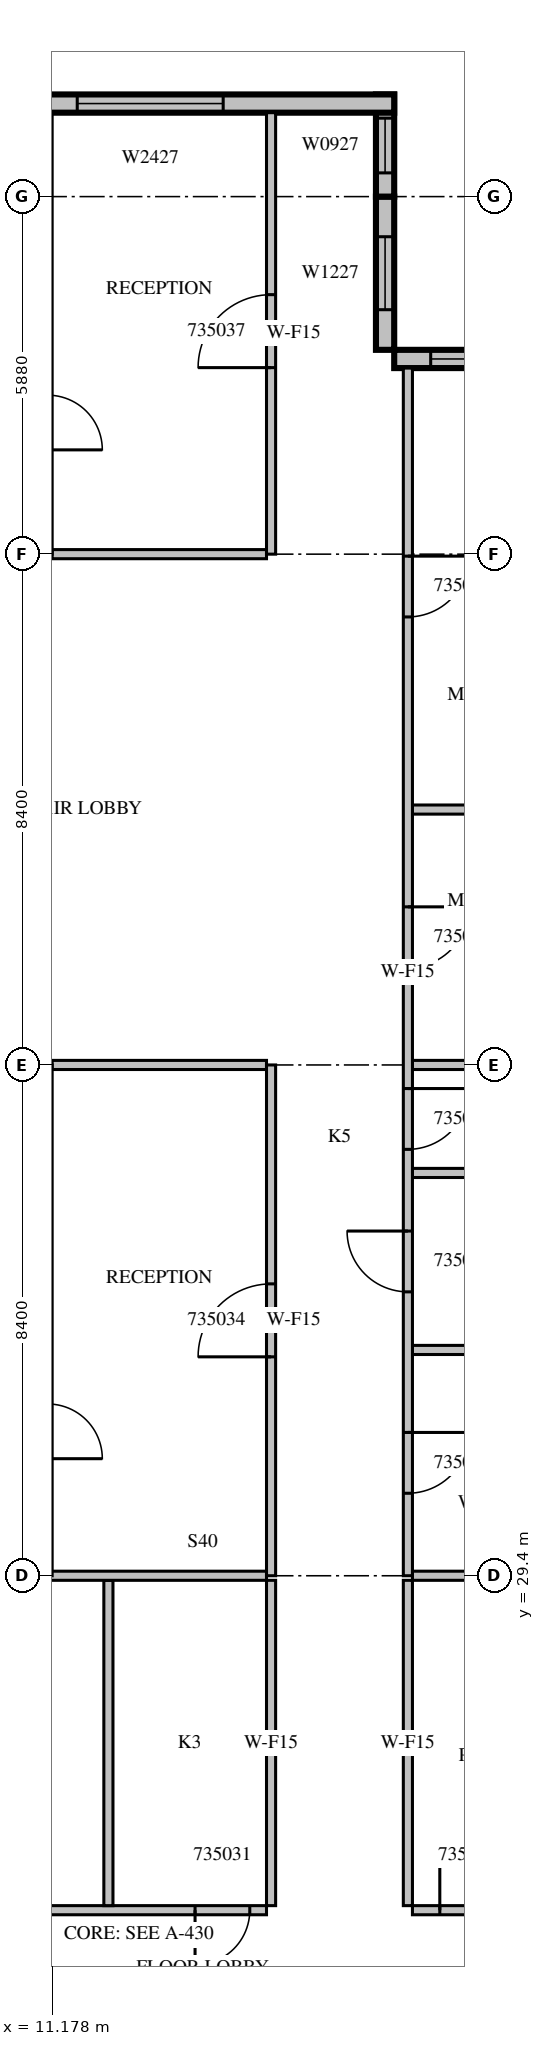
"""IFC4 building model, lengths in metres.
Left out: names, types, materials, properties, quantities, classifications, styles, units other than length and angle.
Written with IfcOpenShell. Run it as: python <this file> out.ifc"""

import sys

from ifc_helpers import new_model, si_unit, direction, frame, frame_2d, origin, place, context, subcontext, project, spatial, rectangle, extrude, source, transform, mapped, element, fill, save


model = new_model("IFC4")
c1 = context("Model", 3, precision=1e-05, world=origin(), true_north=direction((0.0, 1.0)))
c2 = subcontext(c1, "Body", "Model", "MODEL_VIEW")
j1 = project(units=[si_unit("LENGTHUNIT", "METRE"), si_unit("PLANEANGLEUNIT", "RADIAN")], contexts=[c1])
p1 = place(None, origin())
s1 = spatial("IfcSite", under=j1, at=p1, CompositionType="ELEMENT")
p2 = place(p1, origin())
s2 = spatial("IfcBuilding", under=s1, at=p2, CompositionType="ELEMENT")
p3 = place(p2, frame((0.0, 0.0, 158.1)))
s3 = spatial("IfcBuildingStorey", under=s2, at=p3, CompositionType="ELEMENT", Elevation=158.1)
m1 = source(origin(), c2, "Body", "SweptSolid", [
    extrude(rectangle(XDim=4.2, YDim=0.3, at=frame_2d((2.1, 0.0))), origin(), (0.0, 0.0, 1.0), 3.8),
])
p4 = place(p3, frame((21.0, 49.41, 0.0), z_axis=(0.0, 0.0, 1.0), x_axis=(-1.0, 0.0, 0.0)))
e1 = element("IfcWall", 1, at=p4, inside=s3, PredefinedType="STANDARD", context=c2, shape_type="MappedRepresentation", body=[
    mapped(m1, transform((0.0, 0.0, 0.0), scale=1.0)),
])
m2 = source(origin(), c2, "Body", "SweptSolid", [
    extrude(rectangle(XDim=3.0, YDim=2.7, at=frame_2d((1.5, 1.35))), frame((0.0, 0.16, 0.0), z_axis=(0.0, -1.0, 0.0), x_axis=(1.0, 0.0, 0.0)), (0.0, 0.0, 1.0), 0.32),
])
p5 = place(p4, frame((0.6, 0.0, 0.6)))
e2 = element("IfcOpeningElement", 2, at=p5, cuts=e1, PredefinedType="OPENING", context=c2, shape_type="MappedRepresentation", body=[
    mapped(m2, transform((0.0, 0.0, 0.0), scale=1.0)),
])
m3 = source(origin(), c2, "Body", "SweptSolid", [
    extrude(rectangle(XDim=2.52, YDim=0.3, at=frame_2d((1.26, 0.0))), origin(), (0.0, 0.0, 1.0), 3.8),
])
p6 = place(p3, frame((16.65, 49.56, 0.0), z_axis=(0.0, 0.0, 1.0), x_axis=(0.0, 1.0, 0.0)))
e3 = element("IfcWall", 3, at=p6, inside=s3, PredefinedType="STANDARD", context=c2, shape_type="MappedRepresentation", body=[
    mapped(m3, transform((0.0, 0.0, 0.0), scale=1.0)),
])
m4 = source(origin(), c2, "Body", "SweptSolid", [
    extrude(rectangle(XDim=1.2, YDim=2.7, at=frame_2d((0.6, 1.35))), frame((0.0, 0.16, 0.0), z_axis=(0.0, -1.0, 0.0), x_axis=(1.0, 0.0, 0.0)), (0.0, 0.0, 1.0), 0.32),
])
p7 = place(p6, frame((0.66, 0.0, 0.6)))
e4 = element("IfcOpeningElement", 4, at=p7, cuts=e3, PredefinedType="OPENING", context=c2, shape_type="MappedRepresentation", body=[
    mapped(m4, transform((0.0, 0.0, 0.0), scale=1.0)),
])
m5 = source(origin(), c2, "Body", "SweptSolid", [
    extrude(rectangle(XDim=1.68, YDim=0.3, at=frame_2d((0.84, 0.0))), origin(), (0.0, 0.0, 1.0), 3.8),
])
p8 = place(p3, frame((16.65, 52.08, 0.0), z_axis=(0.0, 0.0, 1.0), x_axis=(0.0, 1.0, 0.0)))
e5 = element("IfcWall", 5, at=p8, inside=s3, PredefinedType="STANDARD", context=c2, shape_type="MappedRepresentation", body=[
    mapped(m5, transform((0.0, 0.0, 0.0), scale=1.0)),
])
m6 = source(origin(), c2, "Body", "SweptSolid", [
    extrude(rectangle(XDim=0.9, YDim=2.7, at=frame_2d((0.45, 1.35))), frame((0.0, 0.16, 0.0), z_axis=(0.0, -1.0, 0.0), x_axis=(1.0, 0.0, 0.0)), (0.0, 0.0, 1.0), 0.32),
])
p9 = place(p8, frame((0.39, 0.0, 0.6)))
e6 = element("IfcOpeningElement", 6, at=p9, cuts=e5, PredefinedType="OPENING", context=c2, shape_type="MappedRepresentation", body=[
    mapped(m6, transform((0.0, 0.0, 0.0), scale=1.0)),
])
m7 = source(origin(), c2, "Body", "SweptSolid", [
    extrude(rectangle(XDim=10.5, YDim=0.3, at=frame_2d((5.25, 0.0))), origin(), (0.0, 0.0, 1.0), 3.8),
])
p10 = place(p3, frame((16.8, 53.61, 0.0), z_axis=(0.0, 0.0, 1.0), x_axis=(-1.0, 0.0, 0.0)))
e7 = element("IfcWall", 7, at=p10, inside=s3, PredefinedType="STANDARD", context=c2, shape_type="MappedRepresentation", body=[
    mapped(m7, transform((0.0, 0.0, 0.0), scale=1.0)),
])
m8 = source(origin(), c2, "Body", "SweptSolid", [
    extrude(rectangle(XDim=1.8, YDim=2.7, at=frame_2d((0.9, 1.35))), frame((0.0, 0.16, 0.0), z_axis=(0.0, -1.0, 0.0), x_axis=(1.0, 0.0, 0.0)), (0.0, 0.0, 1.0), 0.32),
])
p11 = place(p10, frame((8.025, 0.0, 0.6)))
e8 = element("IfcOpeningElement", 8, at=p11, cuts=e7, PredefinedType="OPENING", context=c2, shape_type="MappedRepresentation", body=[
    mapped(m8, transform((0.0, 0.0, 0.0), scale=1.0)),
])
m9 = source(origin(), c2, "Body", "SweptSolid", [
    extrude(rectangle(XDim=2.4, YDim=2.7, at=frame_2d((1.2, 1.35))), frame((0.0, 0.16, 0.0), z_axis=(0.0, -1.0, 0.0), x_axis=(1.0, 0.0, 0.0)), (0.0, 0.0, 1.0), 0.32),
])
p12 = place(p10, frame((2.812, 0.0, 0.6)))
e9 = element("IfcOpeningElement", 9, at=p12, cuts=e7, PredefinedType="OPENING", context=c2, shape_type="MappedRepresentation", body=[
    mapped(m9, transform((0.0, 0.0, 0.0), scale=1.0)),
])
m10 = source(origin(), c2, "Body", "SweptSolid", [
    extrude(rectangle(XDim=8.195, YDim=0.15, at=frame_2d((4.098, 0.0))), origin(), (0.0, 0.0, 1.0), 3.8),
])
p13 = place(p3, frame((6.505, 23.9, 0.0), z_axis=(0.0, 0.0, 1.0), x_axis=(1.0, 0.0, 0.0)))
e10 = element("IfcWall", 10, at=p13, inside=s3, PredefinedType="PARTITIONING", context=c2, shape_type="MappedRepresentation", body=[
    mapped(m10, transform((0.0, 0.0, 0.0), scale=1.0)),
])
m11 = source(origin(), c2, "Body", "SweptSolid", [
    extrude(rectangle(XDim=0.9, YDim=2.1, at=frame_2d((0.45, 1.05))), frame((0.0, 0.085, 0.0), z_axis=(0.0, -1.0, 0.0), x_axis=(1.0, 0.0, 0.0)), (0.0, 0.0, 1.0), 0.17),
])
p14 = place(p13, frame((2.095, 0.0, 0.0)))
e11 = element("IfcOpeningElement", 11, at=p14, cuts=e10, PredefinedType="OPENING", context=c2, shape_type="MappedRepresentation", body=[
    mapped(m11, transform((0.0, 0.0, 0.0), scale=1.0)),
])
p15 = place(p13, frame((7.02, 0.0, 0.0)))
e12 = element("IfcOpeningElement", 12, at=p15, cuts=e10, PredefinedType="OPENING", context=c2, shape_type="MappedRepresentation", body=[
    mapped(m11, transform((0.0, 0.0, 0.0), scale=1.0)),
])
m12 = source(origin(), c2, "Body", "SweptSolid", [
    extrude(rectangle(XDim=3.6, YDim=0.15, at=frame_2d((1.8, 0.0))), origin(), (0.0, 0.0, 1.0), 3.8),
])
p16 = place(p3, frame((17.1, 23.9, 0.0), z_axis=(0.0, 0.0, 1.0), x_axis=(1.0, 0.0, 0.0)))
e13 = element("IfcWall", 13, at=p16, inside=s3, PredefinedType="PARTITIONING", context=c2, shape_type="MappedRepresentation", body=[
    mapped(m12, transform((0.0, 0.0, 0.0), scale=1.0)),
])
p17 = place(p16, frame((0.45, 0.0, 0.0)))
e14 = element("IfcOpeningElement", 14, at=p17, cuts=e13, PredefinedType="OPENING", context=c2, shape_type="MappedRepresentation", body=[
    mapped(m11, transform((0.0, 0.0, 0.0), scale=1.0)),
])
m13 = source(origin(), c2, "Body", "SweptSolid", [
    extrude(rectangle(XDim=5.35, YDim=0.15, at=frame_2d((2.675, 0.0))), origin(), (0.0, 0.0, 1.0), 3.8),
])
for number, where, z_axis, x_axis in (
    (15, (12.1, 23.975, 0.0), (0.0, 0.0, 1.0), (0.0, 1.0, 0.0)),
    (16, (14.775, 23.975, 0.0), (0.0, 0.0, 1.0), (0.0, 1.0, 0.0)),
    (17, (17.025, 29.325, 0.0), (0.0, 0.0, 1.0), (0.0, -1.0, 0.0)),
):
    element("IfcWall", number, at=place(p3, frame(where, z_axis=z_axis, x_axis=x_axis)), inside=s3, PredefinedType="PARTITIONING", context=c2, shape_type="MappedRepresentation", body=[
        mapped(m13, transform((0.0, 0.0, 0.0), scale=1.0)),
    ])
m14 = source(origin(), c2, "Body", "SweptSolid", [
    extrude(rectangle(XDim=3.676, YDim=0.15, at=frame_2d((1.838, 0.0))), origin(), (0.0, 0.0, 1.0), 3.8),
])
p18 = place(p3, frame((14.7, 29.4, 0.0), z_axis=(0.0, 0.0, 1.0), x_axis=(-1.0, 0.0, 0.0)))
e18 = element("IfcWall", 18, at=p18, inside=s3, PredefinedType="PARTITIONING", context=c2, shape_type="MappedRepresentation", body=[
    mapped(m14, transform((0.0, 0.0, 0.0), scale=1.0)),
])
m15 = source(origin(), c2, "Body", "SweptSolid", [
    extrude(rectangle(XDim=2.851, YDim=0.15, at=frame_2d((1.425, 0.0))), origin(), (0.0, 0.0, 1.0), 3.8),
])
p19 = place(p3, frame((19.951, 29.4, 0.0), z_axis=(0.0, 0.0, 1.0), x_axis=(-1.0, 0.0, 0.0)))
e19 = element("IfcWall", 19, at=p19, inside=s3, PredefinedType="PARTITIONING", context=c2, shape_type="MappedRepresentation", body=[
    mapped(m15, transform((0.0, 0.0, 0.0), scale=1.0)),
])
m16 = source(origin(), c2, "Body", "SweptSolid", [
    extrude(rectangle(XDim=3.525, YDim=0.15, at=frame_2d((1.762, 0.0))), origin(), (0.0, 0.0, 1.0), 3.8),
])
for number, where, z_axis, x_axis in (
    (20, (14.7, 37.8, 0.0), (0.0, 0.0, 1.0), (-1.0, 0.0, 0.0)),
    (21, (14.7, 46.2, 0.0), (0.0, 0.0, 1.0), (-1.0, 0.0, 0.0)),
):
    element("IfcWall", number, at=place(p3, frame(where, z_axis=z_axis, x_axis=x_axis)), inside=s3, PredefinedType="PARTITIONING", context=c2, shape_type="MappedRepresentation", body=[
        mapped(m16, transform((0.0, 0.0, 0.0), scale=1.0)),
    ])
for number, where, z_axis, x_axis in (
    (22, (17.1, 33.113, 0.0), (0.0, 0.0, 1.0), (1.0, 0.0, 0.0)),
    (23, (17.1, 36.024, 0.0), (0.0, 0.0, 1.0), (1.0, 0.0, 0.0)),
):
    element("IfcWall", number, at=place(p3, frame(where, z_axis=z_axis, x_axis=x_axis)), inside=s3, PredefinedType="PARTITIONING", context=c2, shape_type="MappedRepresentation", body=[
        mapped(m12, transform((0.0, 0.0, 0.0), scale=1.0)),
    ])
p20 = place(p3, frame((19.951, 37.8, 0.0), z_axis=(0.0, 0.0, 1.0), x_axis=(-1.0, 0.0, 0.0)))
e24 = element("IfcWall", 24, at=p20, inside=s3, PredefinedType="PARTITIONING", context=c2, shape_type="MappedRepresentation", body=[
    mapped(m15, transform((0.0, 0.0, 0.0), scale=1.0)),
])
p21 = place(p3, frame((20.7, 42.0, 0.0), z_axis=(0.0, 0.0, 1.0), x_axis=(-1.0, 0.0, 0.0)))
e25 = element("IfcWall", 25, at=p21, inside=s3, PredefinedType="PARTITIONING", context=c2, shape_type="MappedRepresentation", body=[
    mapped(m12, transform((0.0, 0.0, 0.0), scale=1.0)),
])
m17 = source(origin(), c2, "Body", "SweptSolid", [
    extrude(rectangle(XDim=8.4, YDim=0.15, at=frame_2d((4.2, 0.0))), origin(), (0.0, 0.0, 1.0), 3.8),
])
p22 = place(p3, frame((14.775, 29.4, 0.0), z_axis=(0.0, 0.0, 1.0), x_axis=(0.0, 1.0, 0.0)))
e26 = element("IfcWall", 26, at=p22, inside=s3, PredefinedType="PARTITIONING", context=c2, shape_type="MappedRepresentation", body=[
    mapped(m17, transform((0.0, 0.0, 0.0), scale=1.0)),
])
m18 = source(origin(), c2, "Body", "SweptSolid", [
    extrude(rectangle(XDim=1.2, YDim=2.1, at=frame_2d((0.6, 1.05))), frame((0.0, 0.085, 0.0), z_axis=(0.0, -1.0, 0.0), x_axis=(1.0, 0.0, 0.0)), (0.0, 0.0, 1.0), 0.17),
])
p23 = place(p22, frame((3.6, 0.0, 0.0)))
e27 = element("IfcOpeningElement", 27, at=p23, cuts=e26, PredefinedType="OPENING", context=c2, shape_type="MappedRepresentation", body=[
    mapped(m18, transform((0.0, 0.0, 0.0), scale=1.0)),
])
m19 = source(origin(), c2, "Body", "SweptSolid", [
    extrude(rectangle(XDim=7.26, YDim=0.15, at=frame_2d((3.63, 0.0))), origin(), (0.0, 0.0, 1.0), 3.8),
])
p24 = place(p3, frame((14.775, 46.2, 0.0), z_axis=(0.0, 0.0, 1.0), x_axis=(0.0, 1.0, 0.0)))
e28 = element("IfcWall", 28, at=p24, inside=s3, PredefinedType="PARTITIONING", context=c2, shape_type="MappedRepresentation", body=[
    mapped(m19, transform((0.0, 0.0, 0.0), scale=1.0)),
])
p25 = place(p24, frame((3.067, 0.0, 0.0)))
e29 = element("IfcOpeningElement", 29, at=p25, cuts=e28, PredefinedType="OPENING", context=c2, shape_type="MappedRepresentation", body=[
    mapped(m18, transform((0.0, 0.0, 0.0), scale=1.0)),
])
m20 = source(origin(), c2, "Body", "SweptSolid", [
    extrude(rectangle(XDim=19.86, YDim=0.15, at=frame_2d((9.93, 0.0))), origin(), (0.0, 0.0, 1.0), 3.8),
])
p26 = place(p3, frame((17.025, 49.26, 0.0), z_axis=(0.0, 0.0, 1.0), x_axis=(0.0, -1.0, 0.0)))
e30 = element("IfcWall", 30, at=p26, inside=s3, PredefinedType="PARTITIONING", context=c2, shape_type="MappedRepresentation", body=[
    mapped(m20, transform((0.0, 0.0, 0.0), scale=1.0)),
])
m21 = source(origin(), c2, "Body", "SweptSolid", [
    extrude(rectangle(XDim=1.0, YDim=2.1, at=frame_2d((0.5, 1.05))), frame((0.0, 0.085, 0.0), z_axis=(0.0, -1.0, 0.0), x_axis=(1.0, 0.0, 0.0)), (0.0, 0.0, 1.0), 0.17),
])
p27 = place(p26, frame((17.503, 0.0, 0.0)))
e31 = element("IfcOpeningElement", 31, at=p27, cuts=e30, PredefinedType="OPENING", context=c2, shape_type="MappedRepresentation", body=[
    mapped(m21, transform((0.0, 0.0, 0.0), scale=1.0)),
])
p28 = place(p26, frame((14.191, 0.0, 0.0)))
e32 = element("IfcOpeningElement", 32, at=p28, cuts=e30, PredefinedType="OPENING", context=c2, shape_type="MappedRepresentation", body=[
    mapped(m21, transform((0.0, 0.0, 0.0), scale=1.0)),
])
p29 = place(p26, frame((11.848, 0.0, 0.0)))
e33 = element("IfcOpeningElement", 33, at=p29, cuts=e30, PredefinedType="OPENING", context=c2, shape_type="MappedRepresentation", body=[
    mapped(m21, transform((0.0, 0.0, 0.0), scale=1.0)),
])
p30 = place(p26, frame((8.86, 0.0, 0.0)))
e34 = element("IfcOpeningElement", 34, at=p30, cuts=e30, PredefinedType="OPENING", context=c2, shape_type="MappedRepresentation", body=[
    mapped(m21, transform((0.0, 0.0, 0.0), scale=1.0)),
])
p31 = place(p26, frame((3.092, 0.0, 0.0)))
e35 = element("IfcOpeningElement", 35, at=p31, cuts=e30, PredefinedType="OPENING", context=c2, shape_type="MappedRepresentation", body=[
    mapped(m21, transform((0.0, 0.0, 0.0), scale=1.0)),
])
m22 = source(origin(), c2, "Body", "SweptSolid", [
    extrude(rectangle(XDim=3.0, YDim=2.7, at=frame_2d((1.5, 1.35))), frame((0.0, 0.03, 0.0), z_axis=(0.0, -1.0, 0.0), x_axis=(1.0, 0.0, 0.0)), (0.0, 0.0, 1.0), 0.06),
])
p32 = place(p5, origin())
e36 = element("IfcWindow", 36, at=p32, inside=s3, PartitioningType="SINGLE_PANEL", PredefinedType="WINDOW", context=c2, shape_type="MappedRepresentation", body=[
    mapped(m22, transform((0.0, 0.0, 0.0), scale=1.0)),
])
fill(e2, e36)
m23 = source(origin(), c2, "Body", "SweptSolid", [
    extrude(rectangle(XDim=1.2, YDim=2.7, at=frame_2d((0.6, 1.35))), frame((0.0, 0.03, 0.0), z_axis=(0.0, -1.0, 0.0), x_axis=(1.0, 0.0, 0.0)), (0.0, 0.0, 1.0), 0.06),
])
p33 = place(p7, origin())
e37 = element("IfcWindow", 37, at=p33, inside=s3, PartitioningType="SINGLE_PANEL", PredefinedType="WINDOW", context=c2, shape_type="MappedRepresentation", body=[
    mapped(m23, transform((0.0, 0.0, 0.0), scale=1.0)),
])
fill(e4, e37)
m24 = source(origin(), c2, "Body", "SweptSolid", [
    extrude(rectangle(XDim=0.9, YDim=2.7, at=frame_2d((0.45, 1.35))), frame((0.0, 0.03, 0.0), z_axis=(0.0, -1.0, 0.0), x_axis=(1.0, 0.0, 0.0)), (0.0, 0.0, 1.0), 0.06),
])
p34 = place(p9, origin())
e38 = element("IfcWindow", 38, at=p34, inside=s3, PartitioningType="SINGLE_PANEL", PredefinedType="WINDOW", context=c2, shape_type="MappedRepresentation", body=[
    mapped(m24, transform((0.0, 0.0, 0.0), scale=1.0)),
])
fill(e6, e38)
m25 = source(origin(), c2, "Body", "SweptSolid", [
    extrude(rectangle(XDim=2.4, YDim=2.7, at=frame_2d((1.2, 1.35))), frame((0.0, 0.03, 0.0), z_axis=(0.0, -1.0, 0.0), x_axis=(1.0, 0.0, 0.0)), (0.0, 0.0, 1.0), 0.06),
])
p35 = place(p12, origin())
e39 = element("IfcWindow", 39, at=p35, inside=s3, PartitioningType="SINGLE_PANEL", PredefinedType="WINDOW", context=c2, shape_type="MappedRepresentation", body=[
    mapped(m25, transform((0.0, 0.0, 0.0), scale=1.0)),
])
fill(e9, e39)
m26 = source(origin(), c2, "Body", "SweptSolid", [
    extrude(rectangle(XDim=0.9, YDim=2.1, at=frame_2d((0.45, 1.05))), frame((0.0, 0.025, 0.0), z_axis=(0.0, -1.0, 0.0), x_axis=(1.0, 0.0, 0.0)), (0.0, 0.0, 1.0), 0.05),
])
p36 = place(p15, origin())
e40 = element("IfcDoor", 40, at=p36, inside=s3, OperationType="SINGLE_SWING_RIGHT", PredefinedType="DOOR", context=c2, shape_type="MappedRepresentation", body=[
    mapped(m26, transform((0.0, 0.0, 0.0), scale=1.0)),
])
fill(e12, e40)
p37 = place(p17, origin())
e41 = element("IfcDoor", 41, at=p37, inside=s3, OperationType="SINGLE_SWING_LEFT", PredefinedType="DOOR", context=c2, shape_type="MappedRepresentation", body=[
    mapped(m26, transform((0.0, 0.0, 0.0), scale=1.0)),
])
fill(e14, e41)
m27 = source(origin(), c2, "Body", "SweptSolid", [
    extrude(rectangle(XDim=1.2, YDim=2.1, at=frame_2d((0.6, 1.05))), frame((0.0, 0.025, 0.0), z_axis=(0.0, -1.0, 0.0), x_axis=(1.0, 0.0, 0.0)), (0.0, 0.0, 1.0), 0.05),
])
p38 = place(p23, origin())
e42 = element("IfcDoor", 42, at=p38, inside=s3, OperationType="SINGLE_SWING_LEFT", PredefinedType="DOOR", context=c2, shape_type="MappedRepresentation", body=[
    mapped(m27, transform((0.0, 0.0, 0.0), scale=1.0)),
])
fill(e27, e42)
p39 = place(p25, origin())
e43 = element("IfcDoor", 43, at=p39, inside=s3, OperationType="SINGLE_SWING_LEFT", PredefinedType="DOOR", context=c2, shape_type="MappedRepresentation", body=[
    mapped(m27, transform((0.0, 0.0, 0.0), scale=1.0)),
])
fill(e29, e43)
m28 = source(origin(), c2, "Body", "SweptSolid", [
    extrude(rectangle(XDim=1.0, YDim=2.1, at=frame_2d((0.5, 1.05))), frame((0.0, 0.025, 0.0), z_axis=(0.0, -1.0, 0.0), x_axis=(1.0, 0.0, 0.0)), (0.0, 0.0, 1.0), 0.05),
])
p40 = place(p27, origin())
e44 = element("IfcDoor", 44, at=p40, inside=s3, OperationType="SINGLE_SWING_LEFT", PredefinedType="DOOR", context=c2, shape_type="MappedRepresentation", body=[
    mapped(m28, transform((0.0, 0.0, 0.0), scale=1.0)),
])
fill(e31, e44)
p41 = place(p28, origin())
e45 = element("IfcDoor", 45, at=p41, inside=s3, OperationType="SINGLE_SWING_RIGHT", PredefinedType="DOOR", context=c2, shape_type="MappedRepresentation", body=[
    mapped(m28, transform((0.0, 0.0, 0.0), scale=1.0)),
])
fill(e32, e45)
p42 = place(p29, origin())
e46 = element("IfcDoor", 46, at=p42, inside=s3, OperationType="SINGLE_SWING_LEFT", PredefinedType="DOOR", context=c2, shape_type="MappedRepresentation", body=[
    mapped(m28, transform((0.0, 0.0, 0.0), scale=1.0)),
])
fill(e33, e46)
p43 = place(p30, origin())
e47 = element("IfcDoor", 47, at=p43, inside=s3, OperationType="SINGLE_SWING_LEFT", PredefinedType="DOOR", context=c2, shape_type="MappedRepresentation", body=[
    mapped(m28, transform((0.0, 0.0, 0.0), scale=1.0)),
])
fill(e34, e47)
p44 = place(p31, origin())
e48 = element("IfcDoor", 48, at=p44, inside=s3, OperationType="SINGLE_SWING_LEFT", PredefinedType="DOOR", context=c2, shape_type="MappedRepresentation", body=[
    mapped(m28, transform((0.0, 0.0, 0.0), scale=1.0)),
])
fill(e35, e48)
save(model, sys.argv[1])
